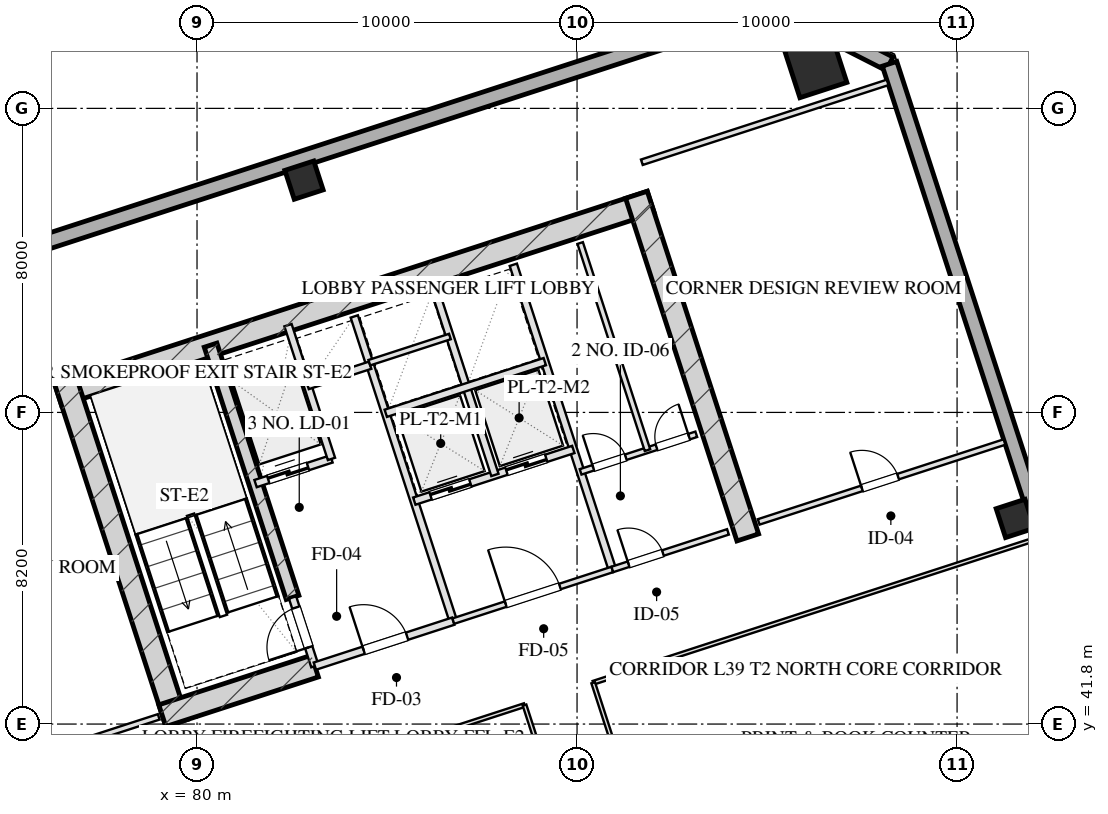
"""IFC4 building model, lengths in metres.
Left out: names, types, materials, properties, quantities, classifications, styles, units other than length and angle.
Written with IfcOpenShell. Run it as: python <this file> out.ifc"""

import sys

from ifc_helpers import new_model, si_unit, direction, frame, frame_2d, origin, origin_2d, place, context, subcontext, project, spatial, rectangle, hollow_rectangle, extrude, element, fill, save


model = new_model("IFC4")
c1 = context("Model", 3, precision=1e-05, world=origin(), true_north=direction((0.0, 1.0)))
c2 = subcontext(c1, "Body", "Model", "MODEL_VIEW")
j1 = project(units=[si_unit("LENGTHUNIT", "METRE"), si_unit("PLANEANGLEUNIT", "RADIAN")], contexts=[c1])
p1 = place(None, origin())
s1 = spatial("IfcSite", under=j1, at=p1, CompositionType="ELEMENT")
p2 = place(p1, origin())
s2 = spatial("IfcBuilding", under=s1, at=p2, CompositionType="ELEMENT")
p3 = place(p2, frame((0.0, 0.0, 149.5)))
s3 = spatial("IfcBuildingStorey", under=s2, at=p3, CompositionType="ELEMENT", Elevation=149.5)
p4 = place(p3, frame((76.344, 50.466, 0.0), z_axis=(0.0, 0.0, 1.0), x_axis=(0.951055727519, 0.309019421968, 0.0)))
e1 = element("IfcWall", 1, at=p4, inside=s3, PredefinedType="SHEAR", context=c2, shape_type="SweptSolid", body=[
    extrude(rectangle(XDim=16.4, YDim=0.6, at=frame_2d((8.2, 0.0))), origin(), (0.0, 0.0, 1.0), 3.45),
])
for number, where, z_axis, x_axis in (
    (2, (79.466, 41.828, 0.0), (0.0, 0.0, 1.0), (-0.309, 0.951, 0.0)),
    (3, (94.492, 46.71, 0.0), (0.0, 0.0, 1.0), (-0.309, 0.951, 0.0)),
):
    element("IfcWall", number, at=place(p3, frame(where, z_axis=z_axis, x_axis=x_axis)), inside=s3, PredefinedType="SHEAR", context=c2, shape_type="SweptSolid", body=[
        extrude(rectangle(XDim=9.48, YDim=0.6, at=frame_2d((4.74, 0.0))), origin(), (0.0, 0.0, 1.0), 3.45),
    ])
p5 = place(p3, frame((82.514, 45.131, 0.0), z_axis=(0.0, 0.0, 1.0), x_axis=(-0.308988790936, 0.951065679686, 0.0)))
e4 = element("IfcWall", 4, at=p5, inside=s3, PredefinedType="SHEAR", context=c2, shape_type="SweptSolid", body=[
    extrude(rectangle(XDim=6.98, YDim=0.35, at=frame_2d((3.49, 0.0))), origin(), (0.0, 0.0, 1.0), 3.45),
])
p6 = place(p3, frame((79.087, 42.021, 0.0), z_axis=(0.0, 0.0, 1.0), x_axis=(0.951062550203, 0.3089984233, 0.0)))
e5 = element("IfcWall", 5, at=p6, inside=s3, PredefinedType="SHEAR", context=c2, shape_type="SweptSolid", body=[
    extrude(rectangle(XDim=4.22, YDim=0.6, at=frame_2d((2.11, 0.0))), origin(), (0.0, 0.0, 1.0), 3.45),
])
p7 = place(p3, frame((96.281, 59.099, 0.0), z_axis=(0.0, 0.0, 1.0), x_axis=(0.951056516295, 0.309016994375, 0.0)))
e6 = element("IfcColumn", 6, at=p7, inside=s3, PredefinedType="COLUMN", context=c2, shape_type="SweptSolid", body=[
    extrude(hollow_rectangle(XDim=1.3, YDim=1.3, WallThickness=0.045, at=origin_2d()), origin(), (0.0, 0.0, 1.0), 3.451),
])
for number, where, z_axis, x_axis in (
    (7, (101.532, 47.21, 0.0), (0.0, 0.0, 1.0), (0.951, 0.309, 0.0)),
    (8, (82.815, 56.112, 0.0), (0.0, 0.0, 1.0), (0.951, 0.309, 0.0)),
):
    element("IfcColumn", number, at=place(p3, frame(where, z_axis=z_axis, x_axis=x_axis)), inside=s3, PredefinedType="COLUMN", context=c2, shape_type="SweptSolid", body=[
        extrude(hollow_rectangle(XDim=0.8, YDim=0.8, WallThickness=0.028, at=origin_2d()), origin(), (0.0, 0.0, 1.0), 3.451),
    ])
p8 = place(p3, frame((81.776, 8.827, 0.0), z_axis=(0.0, 0.0, 1.0), x_axis=(-0.309014228706, 0.951057414911, 0.0)))
e9 = element("IfcWall", 9, at=p8, inside=s3, PredefinedType="SOLIDWALL", context=c2, shape_type="SweptSolid", body=[
    extrude(rectangle(XDim=42.8, YDim=0.4, at=frame_2d((21.4, 0.0))), origin(), (0.0, 0.0, 1.0), 2.61),
])
p9 = place(p3, frame((70.092, 52.556, 0.0), z_axis=(0.0, 0.0, 1.0), x_axis=(0.951057580055, 0.30901372044, 0.0)))
e10 = element("IfcWall", 10, at=p9, inside=s3, PredefinedType="SOLIDWALL", context=c2, shape_type="SweptSolid", body=[
    extrude(rectangle(XDim=26.4, YDim=0.4, at=frame_2d((13.2, 0.0))), origin(), (0.0, 0.0, 1.0), 2.61),
])
p10 = place(p3, frame((95.199, 60.714, 0.0), z_axis=(0.0, 0.0, 1.0), x_axis=(0.891020832027, -0.453962417932, 0.0)))
e11 = element("IfcWall", 11, at=p10, inside=s3, PredefinedType="SOLIDWALL", context=c2, shape_type="SweptSolid", body=[
    extrude(rectangle(XDim=3.394, YDim=0.4, at=frame_2d((1.697, 0.0))), origin(), (0.0, 0.0, 1.0), 2.61),
])
p11 = place(p3, frame((98.224, 59.173, 0.0), z_axis=(0.0, 0.0, 1.0), x_axis=(0.309014228706, -0.951057414911, 0.0)))
e12 = element("IfcWall", 12, at=p11, inside=s3, PredefinedType="SOLIDWALL", context=c2, shape_type="SweptSolid", body=[
    extrude(rectangle(XDim=42.8, YDim=0.4, at=frame_2d((21.4, 0.0))), origin(), (0.0, 0.0, 1.0), 2.61),
])
p12 = place(p11, frame((26.675, 0.0, 0.75)))
e13 = element("IfcOpeningElement", 13, at=p12, cuts=e12, PredefinedType="OPENING", context=c2, shape_type="SweptSolid", body=[
    extrude(rectangle(XDim=2.25, YDim=1.46, at=frame_2d((1.125, 0.73))), frame((0.0, 0.21, 0.0), z_axis=(0.0, -1.0, 0.0), x_axis=(1.0, 0.0, 0.0)), (0.0, 0.0, 1.0), 0.42),
])
p13 = place(p11, frame((13.875, 0.0, 0.75)))
e14 = element("IfcOpeningElement", 14, at=p13, cuts=e12, PredefinedType="OPENING", context=c2, shape_type="SweptSolid", body=[
    extrude(rectangle(XDim=2.25, YDim=1.46, at=frame_2d((1.125, 0.73))), frame((0.0, 0.21, 0.0), z_axis=(0.0, -1.0, 0.0), x_axis=(1.0, 0.0, 0.0)), (0.0, 0.0, 1.0), 0.42),
])
p14 = place(p3, frame((83.101, 43.324, 0.0), z_axis=(0.0, 0.0, 1.0), x_axis=(-0.309048298632, 0.951046344356, 0.0)))
e15 = element("IfcWall", 15, at=p14, inside=s3, PredefinedType="PARTITIONING", context=c2, shape_type="SweptSolid", body=[
    extrude(rectangle(XDim=1.9, YDim=0.2, at=frame_2d((0.95, 0.0))), origin(), (0.0, 0.0, 1.0), 3.175),
])
p15 = place(p14, frame((0.52, 0.0, 0.0)))
e16 = element("IfcOpeningElement", 16, at=p15, cuts=e15, PredefinedType="OPENING", context=c2, shape_type="SweptSolid", body=[
    extrude(rectangle(XDim=1.1, YDim=2.05, at=frame_2d((0.55, 1.025))), frame((0.0, 0.11, 0.0), z_axis=(0.0, -1.0, 0.0), x_axis=(1.0, 0.0, 0.0)), (0.0, 0.0, 1.0), 0.22),
])
p16 = place(p3, frame((86.743, 44.508, 0.0), z_axis=(0.0, 0.0, 1.0), x_axis=(-0.309016001439, 0.951056838919, 0.0)))
e17 = element("IfcWall", 17, at=p16, inside=s3, PredefinedType="PARTITIONING", context=c2, shape_type="SweptSolid", body=[
    extrude(rectangle(XDim=8.43, YDim=0.2, at=frame_2d((4.215, 0.0))), origin(), (0.0, 0.0, 1.0), 3.175),
])
p17 = place(p3, frame((83.101, 43.324, 0.0), z_axis=(0.0, 0.0, 1.0), x_axis=(0.951052804469, 0.309028417967, 0.0)))
e18 = element("IfcWall", 18, at=p17, inside=s3, PredefinedType="PARTITIONING", context=c2, shape_type="SweptSolid", body=[
    extrude(rectangle(XDim=3.83, YDim=0.2, at=frame_2d((1.915, 0.0))), origin(), (0.0, 0.0, 1.0), 3.175),
])
p18 = place(p17, frame((1.35, 0.0, 0.0)))
e19 = element("IfcOpeningElement", 19, at=p18, cuts=e18, PredefinedType="OPENING", context=c2, shape_type="SweptSolid", body=[
    extrude(rectangle(XDim=1.2, YDim=2.05, at=frame_2d((0.6, 1.025))), frame((0.0, 0.11, 0.0), z_axis=(0.0, -1.0, 0.0), x_axis=(1.0, 0.0, 0.0)), (0.0, 0.0, 1.0), 0.22),
])
p19 = place(p3, frame((81.54, 48.127, 0.0), z_axis=(0.0, 0.0, 1.0), x_axis=(0.951062257173, 0.308999325213, 0.0)))
e20 = element("IfcWall", 20, at=p19, inside=s3, PredefinedType="PARTITIONING", context=c2, shape_type="SweptSolid", body=[
    extrude(rectangle(XDim=2.1, YDim=0.2, at=frame_2d((1.05, 0.0))), origin(), (0.0, 0.0, 1.0), 3.175),
])
p20 = place(p19, frame((0.35, 0.0, 0.0)))
e21 = element("IfcOpeningElement", 21, at=p20, cuts=e20, PredefinedType="OPENING", context=c2, shape_type="SweptSolid", body=[
    extrude(rectangle(XDim=1.1, YDim=2.05, at=frame_2d((0.55, 1.025))), frame((0.0, 0.11, 0.0), z_axis=(0.0, -1.0, 0.0), x_axis=(1.0, 0.0, 0.0)), (0.0, 0.0, 1.0), 0.22),
])
p21 = place(p3, frame((83.538, 48.776, 0.0), z_axis=(0.0, 0.0, 1.0), x_axis=(-0.3089935693, 0.951064127245, 0.0)))
e22 = element("IfcWall", 22, at=p21, inside=s3, PredefinedType="PARTITIONING", context=c2, shape_type="SweptSolid", body=[
    extrude(rectangle(XDim=3.7, YDim=0.2, at=frame_2d((1.85, 0.0))), origin(), (0.0, 0.0, 1.0), 3.175),
])
p22 = place(p3, frame((82.91, 50.707, 0.0), z_axis=(0.0, 0.0, 1.0), x_axis=(0.951041328149, 0.309063734775, 0.0)))
e23 = element("IfcWall", 23, at=p22, inside=s3, PredefinedType="PARTITIONING", context=c2, shape_type="SweptSolid", body=[
    extrude(rectangle(XDim=1.73, YDim=0.2, at=frame_2d((0.865, 0.0))), origin(), (0.0, 0.0, 1.0), 3.175),
])
p23 = place(p3, frame((90.928, 45.868, 0.0), z_axis=(0.0, 0.0, 1.0), x_axis=(-0.309042196757, 0.951048327176, 0.0)))
e24 = element("IfcWall", 24, at=p23, inside=s3, PredefinedType="PARTITIONING", context=c2, shape_type="SweptSolid", body=[
    extrude(rectangle(XDim=8.43, YDim=0.2, at=frame_2d((4.215, 0.0))), origin(), (0.0, 0.0, 1.0), 3.175),
])
p24 = place(p3, frame((86.743, 44.508, 0.0), z_axis=(0.0, 0.0, 1.0), x_axis=(0.951063829732, 0.308994485023, 0.0)))
e25 = element("IfcWall", 25, at=p24, inside=s3, PredefinedType="PARTITIONING", context=c2, shape_type="SweptSolid", body=[
    extrude(rectangle(XDim=4.4, YDim=0.15, at=frame_2d((2.2, 0.0))), origin(), (0.0, 0.0, 1.0), 3.175),
])
p25 = place(p24, frame((1.45, 0.0, 0.0)))
e26 = element("IfcOpeningElement", 26, at=p25, cuts=e25, PredefinedType="OPENING", context=c2, shape_type="SweptSolid", body=[
    extrude(rectangle(XDim=1.5, YDim=2.05, at=frame_2d((0.75, 1.025))), frame((0.0, 0.085, 0.0), z_axis=(0.0, -1.0, 0.0), x_axis=(1.0, 0.0, 0.0)), (0.0, 0.0, 1.0), 0.17),
])
p26 = place(p3, frame((85.718, 47.666, 0.0), z_axis=(0.0, 0.0, 1.0), x_axis=(0.951058531764, 0.30901079133, 0.0)))
e27 = element("IfcWall", 27, at=p26, inside=s3, PredefinedType="PARTITIONING", context=c2, shape_type="SweptSolid", body=[
    extrude(rectangle(XDim=4.4, YDim=0.2, at=frame_2d((2.2, 0.0))), origin(), (0.0, 0.0, 1.0), 3.175),
])
p27 = place(p26, frame((0.45, 0.0, 0.0)))
e28 = element("IfcOpeningElement", 28, at=p27, cuts=e27, PredefinedType="OPENING", context=c2, shape_type="SweptSolid", body=[
    extrude(rectangle(XDim=1.1, YDim=2.05, at=frame_2d((0.55, 1.025))), frame((0.0, 0.11, 0.0), z_axis=(0.0, -1.0, 0.0), x_axis=(1.0, 0.0, 0.0)), (0.0, 0.0, 1.0), 0.22),
])
p28 = place(p26, frame((2.55, 0.0, 0.0)))
e29 = element("IfcOpeningElement", 29, at=p28, cuts=e27, PredefinedType="OPENING", context=c2, shape_type="SweptSolid", body=[
    extrude(rectangle(XDim=1.1, YDim=2.05, at=frame_2d((0.55, 1.025))), frame((0.0, 0.11, 0.0), z_axis=(0.0, -1.0, 0.0), x_axis=(1.0, 0.0, 0.0)), (0.0, 0.0, 1.0), 0.22),
])
p29 = place(p3, frame((87.838, 48.354, 0.0), z_axis=(0.0, 0.0, 1.0), x_axis=(-0.3090093719, 0.951058992953, 0.0)))
e30 = element("IfcWall", 30, at=p29, inside=s3, PredefinedType="PARTITIONING", context=c2, shape_type="SweptSolid", body=[
    extrude(rectangle(XDim=5.11, YDim=0.2, at=frame_2d((2.555, 0.0))), origin(), (0.0, 0.0, 1.0), 3.175),
])
p30 = place(p3, frame((84.967, 49.977, 0.0), z_axis=(0.0, 0.0, 1.0), x_axis=(0.951063829732, 0.308994485023, 0.0)))
e31 = element("IfcWall", 31, at=p30, inside=s3, PredefinedType="PARTITIONING", context=c2, shape_type="SweptSolid", body=[
    extrude(rectangle(XDim=4.4, YDim=0.2, at=frame_2d((2.2, 0.0))), origin(), (0.0, 0.0, 1.0), 3.175),
])
p31 = place(p3, frame((84.534, 51.308, 0.0), z_axis=(0.0, 0.0, 1.0), x_axis=(0.951075093106, 0.308959814982, 0.0)))
e32 = element("IfcWall", 32, at=p31, inside=s3, PredefinedType="PARTITIONING", context=c2, shape_type="SweptSolid", body=[
    extrude(rectangle(XDim=2.23, YDim=0.15, at=frame_2d((1.115, 0.0))), origin(), (0.0, 0.0, 1.0), 3.175),
])
p32 = place(p3, frame((90.928, 45.868, 0.0), z_axis=(0.0, 0.0, 1.0), x_axis=(0.951059297078, 0.309008435874, 0.0)))
e33 = element("IfcWall", 33, at=p32, inside=s3, PredefinedType="PARTITIONING", context=c2, shape_type="SweptSolid", body=[
    extrude(rectangle(XDim=3.2, YDim=0.15, at=frame_2d((1.6, 0.0))), origin(), (0.0, 0.0, 1.0), 3.175),
])
p33 = place(p32, frame((0.45, 0.0, 0.0)))
e34 = element("IfcOpeningElement", 34, at=p33, cuts=e33, PredefinedType="OPENING", context=c2, shape_type="SweptSolid", body=[
    extrude(rectangle(XDim=0.95, YDim=2.05, at=frame_2d((0.475, 1.025))), frame((0.0, 0.085, 0.0), z_axis=(0.0, -1.0, 0.0), x_axis=(1.0, 0.0, 0.0)), (0.0, 0.0, 1.0), 0.17),
])
p34 = place(p3, frame((90.094, 48.436, 0.0), z_axis=(0.0, 0.0, 1.0), x_axis=(0.951066581729, 0.308986014439, 0.0)))
e35 = element("IfcWall", 35, at=p34, inside=s3, PredefinedType="PARTITIONING", context=c2, shape_type="SweptSolid", body=[
    extrude(rectangle(XDim=3.2, YDim=0.15, at=frame_2d((1.6, 0.0))), origin(), (0.0, 0.0, 1.0), 3.175),
])
p35 = place(p34, frame((0.35, 0.0, 0.0)))
e36 = element("IfcOpeningElement", 36, at=p35, cuts=e35, PredefinedType="OPENING", context=c2, shape_type="SweptSolid", body=[
    extrude(rectangle(XDim=0.9, YDim=2.05, at=frame_2d((0.45, 1.025))), frame((0.0, 0.085, 0.0), z_axis=(0.0, -1.0, 0.0), x_axis=(1.0, 0.0, 0.0)), (0.0, 0.0, 1.0), 0.17),
])
p36 = place(p34, frame((2.1, 0.0, 0.0)))
e37 = element("IfcOpeningElement", 37, at=p36, cuts=e35, PredefinedType="OPENING", context=c2, shape_type="SweptSolid", body=[
    extrude(rectangle(XDim=0.9, YDim=2.05, at=frame_2d((0.45, 1.025))), frame((0.0, 0.085, 0.0), z_axis=(0.0, -1.0, 0.0), x_axis=(1.0, 0.0, 0.0)), (0.0, 0.0, 1.0), 0.17),
])
p37 = place(p3, frame((91.853, 49.007, 0.0), z_axis=(0.0, 0.0, 1.0), x_axis=(-0.309022487551, 0.951054731437, 0.0)))
e38 = element("IfcWall", 38, at=p37, inside=s3, PredefinedType="PARTITIONING", context=c2, shape_type="SweptSolid", body=[
    extrude(rectangle(XDim=5.73, YDim=0.15, at=frame_2d((2.865, 0.0))), origin(), (0.0, 0.0, 1.0), 3.175),
])
p38 = place(p3, frame((71.955, 39.703, 0.0), z_axis=(0.0, 0.0, 1.0), x_axis=(0.951060977215, 0.309003264738, 0.0)))
e39 = element("IfcWall", 39, at=p38, inside=s3, PredefinedType="PARTITIONING", context=c2, shape_type="SweptSolid", body=[
    extrude(rectangle(XDim=7.4, YDim=0.15, at=frame_2d((3.7, 0.0))), origin(), (0.0, 0.0, 1.0), 3.175),
])
p39 = place(p38, frame((3.108, 0.0, 0.0)))
e40 = element("IfcOpeningElement", 40, at=p39, cuts=e39, PredefinedType="OPENING", context=c2, shape_type="SweptSolid", body=[
    extrude(rectangle(XDim=1.0, YDim=2.05, at=frame_2d((0.5, 1.025))), frame((0.0, 0.085, 0.0), z_axis=(0.0, -1.0, 0.0), x_axis=(1.0, 0.0, 0.0)), (0.0, 0.0, 1.0), 0.17),
])
p40 = place(p3, frame((91.705, 56.582, 0.0), z_axis=(0.0, 0.0, 1.0), x_axis=(0.951057811516, 0.309013008068, 0.0)))
e41 = element("IfcWall", 41, at=p40, inside=s3, PredefinedType="PARTITIONING", context=c2, shape_type="SweptSolid", body=[
    extrude(rectangle(XDim=6.8, YDim=0.15, at=frame_2d((3.4, 0.0))), origin(), (0.0, 0.0, 1.0), 3.175),
])
p41 = place(p3, frame((94.78, 47.119, 0.0), z_axis=(0.0, 0.0, 1.0), x_axis=(0.951057811516, 0.309013008068, 0.0)))
e42 = element("IfcWall", 42, at=p41, inside=s3, PredefinedType="PARTITIONING", context=c2, shape_type="SweptSolid", body=[
    extrude(rectangle(XDim=6.8, YDim=0.15, at=frame_2d((3.4, 0.0))), origin(), (0.0, 0.0, 1.0), 3.175),
])
p42 = place(p41, frame((2.856, 0.0, 0.0)))
e43 = element("IfcOpeningElement", 43, at=p42, cuts=e42, PredefinedType="OPENING", context=c2, shape_type="SweptSolid", body=[
    extrude(rectangle(XDim=1.0, YDim=2.05, at=frame_2d((0.5, 1.025))), frame((0.0, 0.085, 0.0), z_axis=(0.0, -1.0, 0.0), x_axis=(1.0, 0.0, 0.0)), (0.0, 0.0, 1.0), 0.17),
])
p43 = place(p3, frame((80.106, 39.533, 0.0), z_axis=(0.0, 0.0, 1.0), x_axis=(0.951059123431, 0.309008970321, 0.0)))
e44 = element("IfcWall", 44, at=p43, inside=s3, PredefinedType="MOVABLE", context=c2, shape_type="SweptSolid", body=[
    extrude(rectangle(XDim=8.95, YDim=0.1, at=frame_2d((4.475, 0.0))), origin(), (0.0, 0.0, 1.0), 3.175),
])
p44 = place(p3, frame((90.425, 42.886, 0.0), z_axis=(0.0, 0.0, 1.0), x_axis=(0.95105749975, 0.309013967595, 0.0)))
e45 = element("IfcWall", 45, at=p44, inside=s3, PredefinedType="MOVABLE", context=c2, shape_type="SweptSolid", body=[
    extrude(rectangle(XDim=12.25, YDim=0.1, at=frame_2d((6.125, 0.0))), origin(), (0.0, 0.0, 1.0), 3.175),
])
p45 = place(p3, frame((93.76, 26.473, 0.0), z_axis=(0.0, 0.0, 1.0), x_axis=(-0.309004459387, 0.951060589068, 0.0)))
e46 = element("IfcWall", 46, at=p45, inside=s3, PredefinedType="MOVABLE", context=c2, shape_type="SweptSolid", body=[
    extrude(rectangle(XDim=16.64, YDim=0.1, at=frame_2d((8.32, 0.0))), origin(), (0.0, 0.0, 1.0), 3.175),
])
p46 = place(p45, frame((7.68, 0.0, 0.0)))
e47 = element("IfcOpeningElement", 47, at=p46, cuts=e46, PredefinedType="OPENING", context=c2, shape_type="SweptSolid", body=[
    extrude(rectangle(XDim=1.1, YDim=2.05, at=frame_2d((0.55, 1.025))), frame((0.0, 0.06, 0.0), z_axis=(0.0, -1.0, 0.0), x_axis=(1.0, 0.0, 0.0)), (0.0, 0.0, 1.0), 0.12),
])
p47 = place(p3, frame((95.567, 27.061, 0.0), z_axis=(0.0, 0.0, 1.0), x_axis=(-0.30901773025, 0.951056277195, 0.0)))
e48 = element("IfcWall", 48, at=p47, inside=s3, PredefinedType="MOVABLE", context=c2, shape_type="SweptSolid", body=[
    extrude(rectangle(XDim=16.64, YDim=0.1, at=frame_2d((8.32, 0.0))), origin(), (0.0, 0.0, 1.0), 3.175),
])
p48 = place(p47, frame((1.66, 0.0, 0.0)))
e49 = element("IfcOpeningElement", 49, at=p48, cuts=e48, PredefinedType="OPENING", context=c2, shape_type="SweptSolid", body=[
    extrude(rectangle(XDim=0.85, YDim=2.05, at=frame_2d((0.425, 1.025))), frame((0.0, 0.06, 0.0), z_axis=(0.0, -1.0, 0.0), x_axis=(1.0, 0.0, 0.0)), (0.0, 0.0, 1.0), 0.12),
])
p49 = place(p47, frame((6.42, 0.0, 0.0)))
e50 = element("IfcOpeningElement", 50, at=p49, cuts=e48, PredefinedType="OPENING", context=c2, shape_type="SweptSolid", body=[
    extrude(rectangle(XDim=1.0, YDim=2.05, at=frame_2d((0.5, 1.025))), frame((0.0, 0.06, 0.0), z_axis=(0.0, -1.0, 0.0), x_axis=(1.0, 0.0, 0.0)), (0.0, 0.0, 1.0), 0.12),
])
p50 = place(p47, frame((12.58, 0.0, 0.0)))
e51 = element("IfcOpeningElement", 51, at=p50, cuts=e48, PredefinedType="OPENING", context=c2, shape_type="SweptSolid", body=[
    extrude(rectangle(XDim=1.05, YDim=2.05, at=frame_2d((0.525, 1.025))), frame((0.0, 0.06, 0.0), z_axis=(0.0, -1.0, 0.0), x_axis=(1.0, 0.0, 0.0)), (0.0, 0.0, 1.0), 0.12),
])
p51 = place(p15, origin())
e52 = element("IfcDoor", 52, at=p51, inside=s3, OperationType="SINGLE_SWING_LEFT", PredefinedType="DOOR", context=c2, shape_type="SweptSolid", body=[
    extrude(rectangle(XDim=1.1, YDim=2.05, at=frame_2d((0.55, 1.025))), frame((0.0, 0.025, 0.0), z_axis=(0.0, -1.0, 0.0), x_axis=(1.0, 0.0, 0.0)), (0.0, 0.0, 1.0), 0.05),
])
fill(e16, e52)
p52 = place(p18, origin())
e53 = element("IfcDoor", 53, at=p52, inside=s3, OperationType="SINGLE_SWING_LEFT", PredefinedType="DOOR", context=c2, shape_type="SweptSolid", body=[
    extrude(rectangle(XDim=1.2, YDim=2.05, at=frame_2d((0.6, 1.025))), frame((0.0, 0.025, 0.0), z_axis=(0.0, -1.0, 0.0), x_axis=(1.0, 0.0, 0.0)), (0.0, 0.0, 1.0), 0.05),
])
fill(e19, e53)
p53 = place(p20, origin())
e54 = element("IfcDoor", 54, at=p53, inside=s3, OperationType="DOUBLE_DOOR_SLIDING", PredefinedType="DOOR", context=c2, shape_type="SweptSolid", body=[
    extrude(rectangle(XDim=1.1, YDim=2.05, at=frame_2d((0.55, 1.025))), frame((0.0, 0.025, 0.0), z_axis=(0.0, -1.0, 0.0), x_axis=(1.0, 0.0, 0.0)), (0.0, 0.0, 1.0), 0.05),
])
fill(e21, e54)
p54 = place(p25, origin())
e55 = element("IfcDoor", 55, at=p54, inside=s3, OperationType="SINGLE_SWING_LEFT", PredefinedType="DOOR", context=c2, shape_type="SweptSolid", body=[
    extrude(rectangle(XDim=1.5, YDim=2.05, at=frame_2d((0.75, 1.025))), frame((0.0, 0.025, 0.0), z_axis=(0.0, -1.0, 0.0), x_axis=(1.0, 0.0, 0.0)), (0.0, 0.0, 1.0), 0.05),
])
fill(e26, e55)
p55 = place(p27, origin())
e56 = element("IfcDoor", 56, at=p55, inside=s3, OperationType="DOUBLE_DOOR_SLIDING", PredefinedType="DOOR", context=c2, shape_type="SweptSolid", body=[
    extrude(rectangle(XDim=1.1, YDim=2.05, at=frame_2d((0.55, 1.025))), frame((0.0, 0.025, 0.0), z_axis=(0.0, -1.0, 0.0), x_axis=(1.0, 0.0, 0.0)), (0.0, 0.0, 1.0), 0.05),
])
fill(e28, e56)
p56 = place(p28, origin())
e57 = element("IfcDoor", 57, at=p56, inside=s3, OperationType="DOUBLE_DOOR_SLIDING", PredefinedType="DOOR", context=c2, shape_type="SweptSolid", body=[
    extrude(rectangle(XDim=1.1, YDim=2.05, at=frame_2d((0.55, 1.025))), frame((0.0, 0.025, 0.0), z_axis=(0.0, -1.0, 0.0), x_axis=(1.0, 0.0, 0.0)), (0.0, 0.0, 1.0), 0.05),
])
fill(e29, e57)
p57 = place(p33, origin())
e58 = element("IfcDoor", 58, at=p57, inside=s3, OperationType="SINGLE_SWING_LEFT", PredefinedType="DOOR", context=c2, shape_type="SweptSolid", body=[
    extrude(rectangle(XDim=0.95, YDim=2.05, at=frame_2d((0.475, 1.025))), frame((0.0, 0.025, 0.0), z_axis=(0.0, -1.0, 0.0), x_axis=(1.0, 0.0, 0.0)), (0.0, 0.0, 1.0), 0.05),
])
fill(e34, e58)
p58 = place(p35, origin())
e59 = element("IfcDoor", 59, at=p58, inside=s3, OperationType="SINGLE_SWING_LEFT", PredefinedType="DOOR", context=c2, shape_type="SweptSolid", body=[
    extrude(rectangle(XDim=0.9, YDim=2.05, at=frame_2d((0.45, 1.025))), frame((0.0, 0.025, 0.0), z_axis=(0.0, -1.0, 0.0), x_axis=(1.0, 0.0, 0.0)), (0.0, 0.0, 1.0), 0.05),
])
fill(e36, e59)
p59 = place(p36, origin())
e60 = element("IfcDoor", 60, at=p59, inside=s3, OperationType="SINGLE_SWING_RIGHT", PredefinedType="DOOR", context=c2, shape_type="SweptSolid", body=[
    extrude(rectangle(XDim=0.9, YDim=2.05, at=frame_2d((0.45, 1.025))), frame((0.0, 0.025, 0.0), z_axis=(0.0, -1.0, 0.0), x_axis=(1.0, 0.0, 0.0)), (0.0, 0.0, 1.0), 0.05),
])
fill(e37, e60)
p60 = place(p42, origin())
e61 = element("IfcDoor", 61, at=p60, inside=s3, OperationType="SINGLE_SWING_LEFT", PredefinedType="DOOR", context=c2, shape_type="SweptSolid", body=[
    extrude(rectangle(XDim=1.0, YDim=2.05, at=frame_2d((0.5, 1.025))), frame((0.0, 0.025, 0.0), z_axis=(0.0, -1.0, 0.0), x_axis=(1.0, 0.0, 0.0)), (0.0, 0.0, 1.0), 0.05),
])
fill(e43, e61)
save(model, sys.argv[1])
